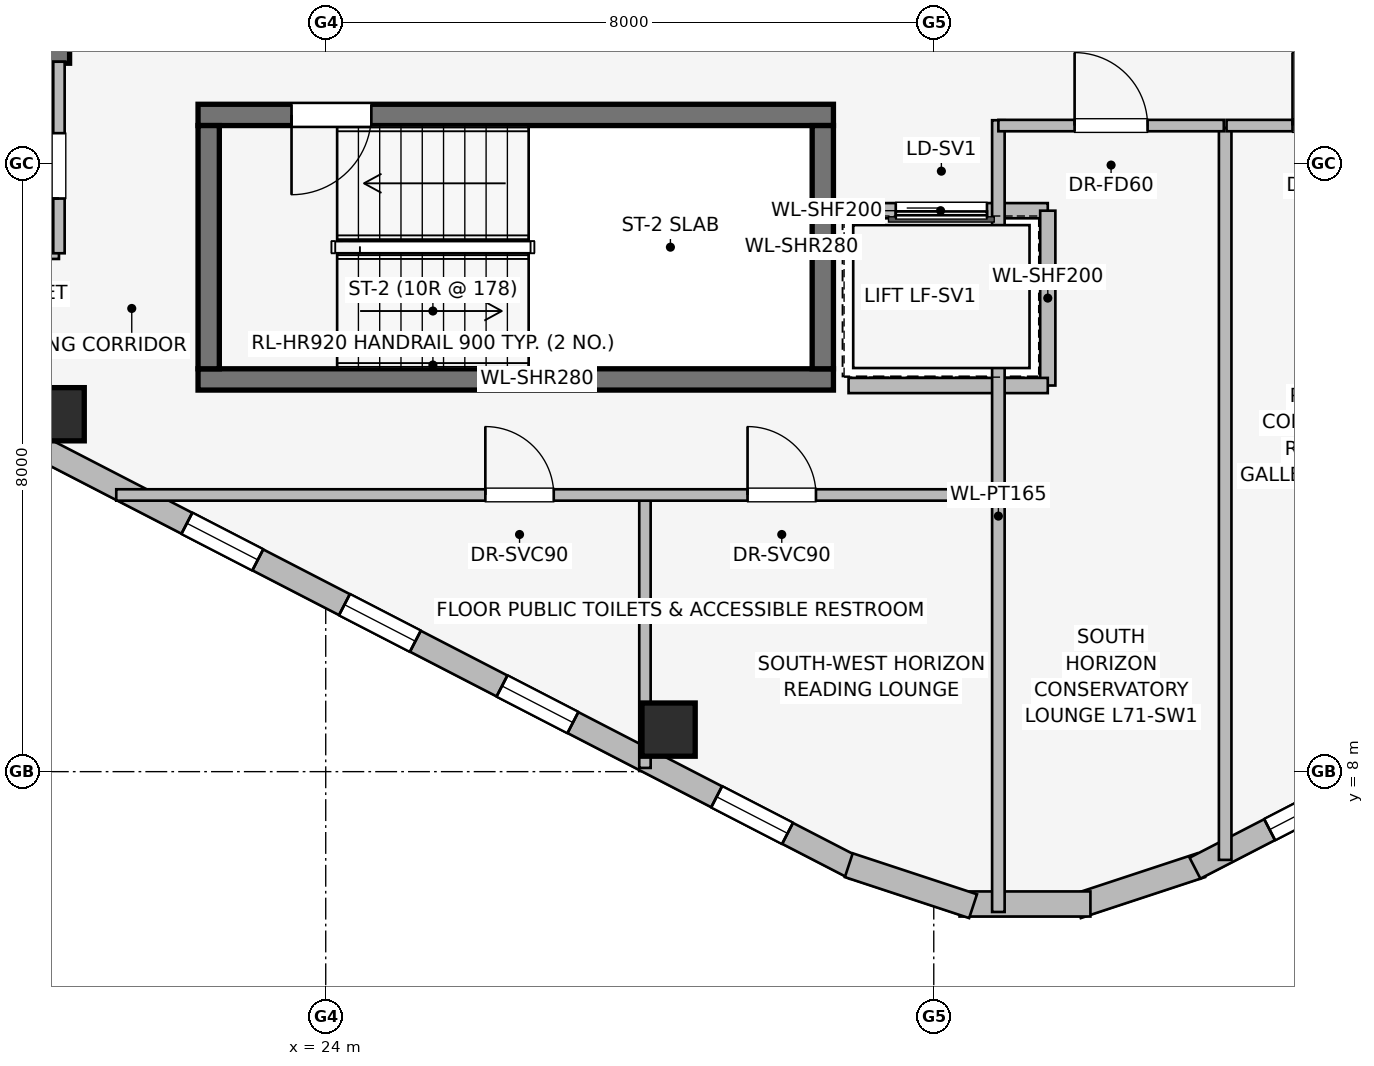
"""IFC4 building model, lengths in metres.
Left out: names, types, materials, properties, quantities, classifications, styles, units other than length and angle.
Written with IfcOpenShell. Run it as: python <this file> out.ifc"""

import sys

from ifc_helpers import new_model, si_unit, direction, frame, frame_2d, origin, origin_2d, place, context, subcontext, project, spatial, rectangle, extrude, element, fill, save


model = new_model("IFC4")
c1 = context("Model", 3, precision=1e-05, world=origin(), true_north=direction((0.0, 1.0)))
c2 = subcontext(c1, "Body", "Model", "MODEL_VIEW")
j1 = project(units=[si_unit("LENGTHUNIT", "METRE"), si_unit("PLANEANGLEUNIT", "RADIAN")], contexts=[c1])
p1 = place(None, origin())
s1 = spatial("IfcSite", under=j1, at=p1, CompositionType="ELEMENT")
p2 = place(p1, origin())
s2 = spatial("IfcBuilding", under=s1, at=p2, CompositionType="ELEMENT")
p3 = place(p2, frame((0.0, 0.0, 259.65)))
s3 = spatial("IfcBuildingStorey", under=s2, at=p3, CompositionType="ELEMENT", Elevation=259.65)
p4 = place(p3, frame((16.87, 17.46, 0.0), z_axis=(0.0, 0.0, 1.0), x_axis=(1.0, 0.0, 0.0)))
e1 = element("IfcWall", 1, at=p4, inside=s3, PredefinedType="SHEAR", context=c2, shape_type="SweptSolid", body=[
    extrude(rectangle(XDim=3.76, YDim=0.28, at=frame_2d((1.88, 0.0))), origin(), (0.0, 0.0, 1.0), 3.55),
])
p5 = place(p3, frame((22.32, 13.16, 0.0), z_axis=(0.0, 0.0, 1.0), x_axis=(1.0, 0.0, 0.0)))
e2 = element("IfcWall", 2, at=p5, inside=s3, PredefinedType="SHEAR", context=c2, shape_type="SweptSolid", body=[
    extrude(rectangle(XDim=8.36, YDim=0.28, at=frame_2d((4.18, 0.0))), origin(), (0.0, 0.0, 1.0), 3.55),
])
p6 = place(p3, frame((30.68, 16.64, 0.0), z_axis=(0.0, 0.0, 1.0), x_axis=(-1.0, 0.0, 0.0)))
e3 = element("IfcWall", 3, at=p6, inside=s3, PredefinedType="SHEAR", context=c2, shape_type="SweptSolid", body=[
    extrude(rectangle(XDim=8.36, YDim=0.28, at=frame_2d((4.18, 0.0))), origin(), (0.0, 0.0, 1.0), 3.55),
])
p7 = place(p6, frame((6.08, 0.0, 0.0)))
e4 = element("IfcOpeningElement", 4, at=p7, cuts=e3, PredefinedType="OPENING", context=c2, shape_type="SweptSolid", body=[
    extrude(rectangle(XDim=1.05, YDim=2.0, at=frame_2d((0.525, 1.0))), frame((0.0, 0.15, 0.0), z_axis=(0.0, -1.0, 0.0), x_axis=(1.0, 0.0, 0.0)), (0.0, 0.0, 1.0), 0.3),
])
for number, where, z_axis, x_axis in (
    (5, (22.46, 16.5, 0.0), (0.0, 0.0, 1.0), (0.0, -1.0, 0.0)),
    (6, (30.54, 13.3, 0.0), (0.0, 0.0, 1.0), (0.0, 1.0, 0.0)),
):
    element("IfcWall", number, at=place(p3, frame(where, z_axis=z_axis, x_axis=x_axis)), inside=s3, PredefinedType="SHEAR", context=c2, shape_type="SweptSolid", body=[
        extrude(rectangle(XDim=3.2, YDim=0.28, at=frame_2d((1.6, 0.0))), origin(), (0.0, 0.0, 1.0), 3.55),
    ])
for number, where, z_axis, x_axis in (
    (7, (20.473, 12.702, 0.0), (0.0, 0.0, 1.0), (1.0, 0.0, 0.0)),
    (8, (28.511, 8.553, 0.0), (0.0, 0.0, 1.0), (1.0, 0.0, 0.0)),
):
    element("IfcColumn", number, at=place(p3, frame(where, z_axis=z_axis, x_axis=x_axis)), inside=s3, PredefinedType="COLUMN", context=c2, shape_type="SweptSolid", body=[
        extrude(rectangle(XDim=0.7, YDim=0.7, at=origin_2d()), origin(), (0.0, 0.0, 1.0), 3.55),
    ])
p8 = place(p3, frame((30.963, 6.73, 0.0), z_axis=(0.0, 0.0, 1.0), x_axis=(-0.888581481622, 0.458718814218, 0.0)))
e9 = element("IfcWall", 9, at=p8, inside=s3, PredefinedType="STANDARD", context=c2, shape_type="SweptSolid", body=[
    extrude(rectangle(XDim=15.077, YDim=0.31, at=frame_2d((7.539, 0.0))), origin(), (0.0, 0.0, 1.0), 3.29),
])
p9 = place(p8, frame((0.998, 0.0, 0.75)))
e10 = element("IfcOpeningElement", 10, at=p9, cuts=e9, PredefinedType="OPENING", context=c2, shape_type="SweptSolid", body=[
    extrude(rectangle(XDim=1.05, YDim=1.4, at=frame_2d((0.525, 0.7))), frame((0.0, 0.165, 0.0), z_axis=(0.0, -1.0, 0.0), x_axis=(1.0, 0.0, 0.0)), (0.0, 0.0, 1.0), 0.33),
])
p10 = place(p8, frame((4.176, 0.0, 0.75)))
e11 = element("IfcOpeningElement", 11, at=p10, cuts=e9, PredefinedType="OPENING", context=c2, shape_type="SweptSolid", body=[
    extrude(rectangle(XDim=1.05, YDim=1.4, at=frame_2d((0.525, 0.7))), frame((0.0, 0.165, 0.0), z_axis=(0.0, -1.0, 0.0), x_axis=(1.0, 0.0, 0.0)), (0.0, 0.0, 1.0), 0.33),
])
p11 = place(p8, frame((6.509, 0.0, 0.75)))
e12 = element("IfcOpeningElement", 12, at=p11, cuts=e9, PredefinedType="OPENING", context=c2, shape_type="SweptSolid", body=[
    extrude(rectangle(XDim=1.05, YDim=1.4, at=frame_2d((0.525, 0.7))), frame((0.0, 0.165, 0.0), z_axis=(0.0, -1.0, 0.0), x_axis=(1.0, 0.0, 0.0)), (0.0, 0.0, 1.0), 0.33),
])
p12 = place(p8, frame((8.842, 0.0, 0.75)))
e13 = element("IfcOpeningElement", 13, at=p12, cuts=e9, PredefinedType="OPENING", context=c2, shape_type="SweptSolid", body=[
    extrude(rectangle(XDim=1.05, YDim=1.4, at=frame_2d((0.525, 0.7))), frame((0.0, 0.165, 0.0), z_axis=(0.0, -1.0, 0.0), x_axis=(1.0, 0.0, 0.0)), (0.0, 0.0, 1.0), 0.33),
])
p13 = place(p8, frame((13.029, 0.0, 0.75)))
e14 = element("IfcOpeningElement", 14, at=p13, cuts=e9, PredefinedType="OPENING", context=c2, shape_type="SweptSolid", body=[
    extrude(rectangle(XDim=1.05, YDim=1.4, at=frame_2d((0.525, 0.7))), frame((0.0, 0.165, 0.0), z_axis=(0.0, -1.0, 0.0), x_axis=(1.0, 0.0, 0.0)), (0.0, 0.0, 1.0), 0.33),
])
p14 = place(p3, frame((35.518, 6.769, 0.0), z_axis=(0.0, 0.0, 1.0), x_axis=(-0.949713440491, -0.313120393699, 0.0)))
e15 = element("IfcWall", 15, at=p14, inside=s3, PredefinedType="STANDARD", context=c2, shape_type="SweptSolid", body=[
    extrude(rectangle(XDim=1.722, YDim=0.33, at=frame_2d((0.861, 0.0))), origin(), (0.0, 0.0, 1.0), 3.29),
])
p15 = place(p3, frame((34.061, 6.259, 0.0), z_axis=(0.0, 0.0, 1.0), x_axis=(-1.0, 0.0, 0.0)))
e16 = element("IfcWall", 16, at=p15, inside=s3, PredefinedType="STANDARD", context=c2, shape_type="SweptSolid", body=[
    extrude(rectangle(XDim=1.722, YDim=0.33, at=frame_2d((0.861, 0.0))), origin(), (0.0, 0.0, 1.0), 3.29),
])
p16 = place(p3, frame((32.517, 6.23, 0.0), z_axis=(0.0, 0.0, 1.0), x_axis=(-0.949713440491, 0.313120393699, 0.0)))
e17 = element("IfcWall", 17, at=p16, inside=s3, PredefinedType="STANDARD", context=c2, shape_type="SweptSolid", body=[
    extrude(rectangle(XDim=1.722, YDim=0.33, at=frame_2d((0.861, 0.0))), origin(), (0.0, 0.0, 1.0), 3.29),
])
p17 = place(p3, frame((48.834, 13.646, 0.0), z_axis=(0.0, 0.0, 1.0), x_axis=(-0.888581481622, -0.458718814218, 0.0)))
e18 = element("IfcWall", 18, at=p17, inside=s3, PredefinedType="STANDARD", context=c2, shape_type="SweptSolid", body=[
    extrude(rectangle(XDim=15.077, YDim=0.31, at=frame_2d((7.539, 0.0))), origin(), (0.0, 0.0, 1.0), 3.29),
])
p18 = place(p17, frame((0.998, 0.0, 0.75)))
e19 = element("IfcOpeningElement", 19, at=p18, cuts=e18, PredefinedType="OPENING", context=c2, shape_type="SweptSolid", body=[
    extrude(rectangle(XDim=1.05, YDim=1.4, at=frame_2d((0.525, 0.7))), frame((0.0, 0.165, 0.0), z_axis=(0.0, -1.0, 0.0), x_axis=(1.0, 0.0, 0.0)), (0.0, 0.0, 1.0), 0.33),
])
p19 = place(p17, frame((4.295, 0.0, 0.75)))
e20 = element("IfcOpeningElement", 20, at=p19, cuts=e18, PredefinedType="OPENING", context=c2, shape_type="SweptSolid", body=[
    extrude(rectangle(XDim=1.05, YDim=1.4, at=frame_2d((0.525, 0.7))), frame((0.0, 0.165, 0.0), z_axis=(0.0, -1.0, 0.0), x_axis=(1.0, 0.0, 0.0)), (0.0, 0.0, 1.0), 0.33),
])
p20 = place(p17, frame((6.862, 0.0, 0.75)))
e21 = element("IfcOpeningElement", 21, at=p20, cuts=e18, PredefinedType="OPENING", context=c2, shape_type="SweptSolid", body=[
    extrude(rectangle(XDim=1.05, YDim=1.4, at=frame_2d((0.525, 0.7))), frame((0.0, 0.165, 0.0), z_axis=(0.0, -1.0, 0.0), x_axis=(1.0, 0.0, 0.0)), (0.0, 0.0, 1.0), 0.33),
])
p21 = place(p17, frame((9.429, 0.0, 0.75)))
e22 = element("IfcOpeningElement", 22, at=p21, cuts=e18, PredefinedType="OPENING", context=c2, shape_type="SweptSolid", body=[
    extrude(rectangle(XDim=1.05, YDim=1.4, at=frame_2d((0.525, 0.7))), frame((0.0, 0.165, 0.0), z_axis=(0.0, -1.0, 0.0), x_axis=(1.0, 0.0, 0.0)), (0.0, 0.0, 1.0), 0.33),
])
p22 = place(p17, frame((12.922, 0.0, 0.75)))
e23 = element("IfcOpeningElement", 23, at=p22, cuts=e18, PredefinedType="OPENING", context=c2, shape_type="SweptSolid", body=[
    extrude(rectangle(XDim=1.05, YDim=1.4, at=frame_2d((0.525, 0.7))), frame((0.0, 0.165, 0.0), z_axis=(0.0, -1.0, 0.0), x_axis=(1.0, 0.0, 0.0)), (0.0, 0.0, 1.0), 0.33),
])
p23 = place(p3, frame((33.5, 15.38, 0.0), z_axis=(0.0, 0.0, 1.0), x_axis=(-1.0, 0.0, 0.0)))
e24 = element("IfcWall", 24, at=p23, inside=s3, PredefinedType="PARTITIONING", context=c2, shape_type="SweptSolid", body=[
    extrude(rectangle(XDim=2.82, YDim=0.2, at=frame_2d((1.41, 0.0))), origin(), (0.0, 0.0, 1.0), 3.29),
])
p24 = place(p23, frame((0.8, 0.0, 0.0)))
e25 = element("IfcOpeningElement", 25, at=p24, cuts=e24, PredefinedType="OPENING", context=c2, shape_type="SweptSolid", body=[
    extrude(rectangle(XDim=1.2, YDim=2.2, at=frame_2d((0.6, 1.1))), frame((0.0, 0.11, 0.0), z_axis=(0.0, -1.0, 0.0), x_axis=(1.0, 0.0, 0.0)), (0.0, 0.0, 1.0), 0.22),
])
p25 = place(p3, frame((33.5, 13.08, 0.0), z_axis=(0.0, 0.0, 1.0), x_axis=(0.0, 1.0, 0.0)))
e26 = element("IfcWall", 26, at=p25, inside=s3, PredefinedType="PARTITIONING", context=c2, shape_type="SweptSolid", body=[
    extrude(rectangle(XDim=2.3, YDim=0.2, at=frame_2d((1.15, 0.0))), origin(), (0.0, 0.0, 1.0), 3.29),
])
p26 = place(p3, frame((30.879, 13.08, 0.0), z_axis=(0.0, 0.0, 1.0), x_axis=(1.0, 0.0, 0.0)))
e27 = element("IfcWall", 27, at=p26, inside=s3, PredefinedType="PARTITIONING", context=c2, shape_type="SweptSolid", body=[
    extrude(rectangle(XDim=2.621, YDim=0.2, at=frame_2d((1.311, 0.0))), origin(), (0.0, 0.0, 1.0), 3.29),
])
p27 = place(p3, frame((18.1, 14.82, 0.0), z_axis=(0.0, 0.0, 1.0), x_axis=(1.0, 0.0, 0.0)))
e28 = element("IfcWall", 28, at=p27, inside=s3, PredefinedType="PARTITIONING", context=c2, shape_type="SweptSolid", body=[
    extrude(rectangle(XDim=2.39, YDim=0.15, at=frame_2d((1.195, 0.0))), origin(), (0.0, 0.0, 1.0), 3.29),
])
p28 = place(p3, frame((20.49, 14.82, 0.0), z_axis=(0.0, 0.0, 1.0), x_axis=(0.0, 1.0, 0.0)))
e29 = element("IfcWall", 29, at=p28, inside=s3, PredefinedType="PARTITIONING", context=c2, shape_type="SweptSolid", body=[
    extrude(rectangle(XDim=2.52, YDim=0.15, at=frame_2d((1.26, 0.0))), origin(), (0.0, 0.0, 1.0), 3.29),
])
p29 = place(p28, frame((0.72, 0.0, 0.0)))
e30 = element("IfcOpeningElement", 30, at=p29, cuts=e29, PredefinedType="OPENING", context=c2, shape_type="SweptSolid", body=[
    extrude(rectangle(XDim=0.86, YDim=2.0, at=frame_2d((0.43, 1.0))), frame((0.0, 0.085, 0.0), z_axis=(0.0, -1.0, 0.0), x_axis=(1.0, 0.0, 0.0)), (0.0, 0.0, 1.0), 0.17),
])
p30 = place(p3, frame((32.85, 6.154, 0.0), z_axis=(0.0, 0.0, 1.0), x_axis=(0.0, 1.0, 0.0)))
e31 = element("IfcWall", 31, at=p30, inside=s3, PredefinedType="PARTITIONING", context=c2, shape_type="SweptSolid", body=[
    extrude(rectangle(XDim=10.416, YDim=0.165, at=frame_2d((5.208, 0.0))), origin(), (0.0, 0.0, 1.0), 3.29),
])
p31 = place(p3, frame((28.2, 8.049, 0.0), z_axis=(0.0, 0.0, 1.0), x_axis=(0.0, 1.0, 0.0)))
e32 = element("IfcWall", 32, at=p31, inside=s3, PredefinedType="PARTITIONING", context=c2, shape_type="SweptSolid", body=[
    extrude(rectangle(XDim=3.591, YDim=0.15, at=frame_2d((1.795, 0.0))), origin(), (0.0, 0.0, 1.0), 3.29),
])
p32 = place(p3, frame((21.244, 11.64, 0.0), z_axis=(0.0, 0.0, 1.0), x_axis=(1.0, 0.0, 0.0)))
e33 = element("IfcWall", 33, at=p32, inside=s3, PredefinedType="PARTITIONING", context=c2, shape_type="SweptSolid", body=[
    extrude(rectangle(XDim=11.606, YDim=0.15, at=frame_2d((5.803, 0.0))), origin(), (0.0, 0.0, 1.0), 2.833),
])
p33 = place(p32, frame((4.856, 0.0, 0.0)))
e34 = element("IfcOpeningElement", 34, at=p33, cuts=e33, PredefinedType="OPENING", context=c2, shape_type="SweptSolid", body=[
    extrude(rectangle(XDim=0.9, YDim=2.0, at=frame_2d((0.45, 1.0))), frame((0.0, 0.085, 0.0), z_axis=(0.0, -1.0, 0.0), x_axis=(1.0, 0.0, 0.0)), (0.0, 0.0, 1.0), 0.17),
])
p34 = place(p32, frame((8.306, 0.0, 0.0)))
e35 = element("IfcOpeningElement", 35, at=p34, cuts=e33, PredefinedType="OPENING", context=c2, shape_type="SweptSolid", body=[
    extrude(rectangle(XDim=0.9, YDim=2.0, at=frame_2d((0.45, 1.0))), frame((0.0, 0.085, 0.0), z_axis=(0.0, -1.0, 0.0), x_axis=(1.0, 0.0, 0.0)), (0.0, 0.0, 1.0), 0.17),
])
p35 = place(p3, frame((35.834, 6.839, 0.0), z_axis=(0.0, 0.0, 1.0), x_axis=(0.0, 1.0, 0.0)))
e36 = element("IfcWall", 36, at=p35, inside=s3, PredefinedType="PARTITIONING", context=c2, shape_type="SweptSolid", body=[
    extrude(rectangle(XDim=9.631, YDim=0.165, at=frame_2d((4.815, 0.0))), origin(), (0.0, 0.0, 1.0), 3.29),
])
p36 = place(p3, frame((32.85, 16.5, 0.0), z_axis=(0.0, 0.0, 1.0), x_axis=(1.0, 0.0, 0.0)))
e37 = element("IfcWall", 37, at=p36, inside=s3, PredefinedType="PARTITIONING", context=c2, shape_type="SweptSolid", body=[
    extrude(rectangle(XDim=2.966, YDim=0.15, at=frame_2d((1.483, 0.0))), origin(), (0.0, 0.0, 1.0), 3.29),
])
p37 = place(p36, frame((1.003, 0.0, 0.0)))
e38 = element("IfcOpeningElement", 38, at=p37, cuts=e37, PredefinedType="OPENING", context=c2, shape_type="SweptSolid", body=[
    extrude(rectangle(XDim=0.96, YDim=2.0, at=frame_2d((0.48, 1.0))), frame((0.0, 0.085, 0.0), z_axis=(0.0, -1.0, 0.0), x_axis=(1.0, 0.0, 0.0)), (0.0, 0.0, 1.0), 0.17),
])
p38 = place(p3, frame((35.852, 16.5, 0.0), z_axis=(0.0, 0.0, 1.0), x_axis=(1.0, 0.0, 0.0)))
e39 = element("IfcWall", 39, at=p38, inside=s3, PredefinedType="PARTITIONING", context=c2, shape_type="SweptSolid", body=[
    extrude(rectangle(XDim=2.696, YDim=0.15, at=frame_2d((1.348, 0.0))), origin(), (0.0, 0.0, 1.0), 3.29),
])
p39 = place(p38, frame((0.868, 0.0, 0.0)))
e40 = element("IfcOpeningElement", 40, at=p39, cuts=e39, PredefinedType="OPENING", context=c2, shape_type="SweptSolid", body=[
    extrude(rectangle(XDim=0.96, YDim=2.0, at=frame_2d((0.48, 1.0))), frame((0.0, 0.085, 0.0), z_axis=(0.0, -1.0, 0.0), x_axis=(1.0, 0.0, 0.0)), (0.0, 0.0, 1.0), 0.17),
])
p40 = place(p9, origin())
e41 = element("IfcWindow", 41, at=p40, inside=s3, PartitioningType="SINGLE_PANEL", PredefinedType="WINDOW", context=c2, shape_type="SweptSolid", body=[
    extrude(rectangle(XDim=1.05, YDim=1.4, at=frame_2d((0.525, 0.7))), frame((0.0, 0.03, 0.0), z_axis=(0.0, -1.0, 0.0), x_axis=(1.0, 0.0, 0.0)), (0.0, 0.0, 1.0), 0.06),
])
fill(e10, e41)
p41 = place(p10, origin())
e42 = element("IfcWindow", 42, at=p41, inside=s3, PartitioningType="SINGLE_PANEL", PredefinedType="WINDOW", context=c2, shape_type="SweptSolid", body=[
    extrude(rectangle(XDim=1.05, YDim=1.4, at=frame_2d((0.525, 0.7))), frame((0.0, 0.03, 0.0), z_axis=(0.0, -1.0, 0.0), x_axis=(1.0, 0.0, 0.0)), (0.0, 0.0, 1.0), 0.06),
])
fill(e11, e42)
p42 = place(p11, origin())
e43 = element("IfcWindow", 43, at=p42, inside=s3, PartitioningType="SINGLE_PANEL", PredefinedType="WINDOW", context=c2, shape_type="SweptSolid", body=[
    extrude(rectangle(XDim=1.05, YDim=1.4, at=frame_2d((0.525, 0.7))), frame((0.0, 0.03, 0.0), z_axis=(0.0, -1.0, 0.0), x_axis=(1.0, 0.0, 0.0)), (0.0, 0.0, 1.0), 0.06),
])
fill(e12, e43)
p43 = place(p12, origin())
e44 = element("IfcWindow", 44, at=p43, inside=s3, PartitioningType="SINGLE_PANEL", PredefinedType="WINDOW", context=c2, shape_type="SweptSolid", body=[
    extrude(rectangle(XDim=1.05, YDim=1.4, at=frame_2d((0.525, 0.7))), frame((0.0, 0.03, 0.0), z_axis=(0.0, -1.0, 0.0), x_axis=(1.0, 0.0, 0.0)), (0.0, 0.0, 1.0), 0.06),
])
fill(e13, e44)
p44 = place(p22, origin())
e45 = element("IfcWindow", 45, at=p44, inside=s3, PartitioningType="SINGLE_PANEL", PredefinedType="WINDOW", context=c2, shape_type="SweptSolid", body=[
    extrude(rectangle(XDim=1.05, YDim=1.4, at=frame_2d((0.525, 0.7))), frame((0.0, 0.03, 0.0), z_axis=(0.0, -1.0, 0.0), x_axis=(1.0, 0.0, 0.0)), (0.0, 0.0, 1.0), 0.06),
])
fill(e23, e45)
p45 = place(p7, origin())
e46 = element("IfcDoor", 46, at=p45, inside=s3, OperationType="SINGLE_SWING_RIGHT", PredefinedType="DOOR", context=c2, shape_type="SweptSolid", body=[
    extrude(rectangle(XDim=1.05, YDim=2.0, at=frame_2d((0.525, 1.0))), frame((0.0, 0.025, 0.0), z_axis=(0.0, -1.0, 0.0), x_axis=(1.0, 0.0, 0.0)), (0.0, 0.0, 1.0), 0.05),
])
fill(e4, e46)
p46 = place(p24, origin())
e47 = element("IfcDoor", 47, at=p46, inside=s3, OperationType="SLIDING_TO_RIGHT", PredefinedType="DOOR", context=c2, shape_type="SweptSolid", body=[
    extrude(rectangle(XDim=1.2, YDim=2.2, at=frame_2d((0.6, 1.1))), frame((0.0, 0.025, 0.0), z_axis=(0.0, -1.0, 0.0), x_axis=(1.0, 0.0, 0.0)), (0.0, 0.0, 1.0), 0.05),
])
fill(e25, e47)
p47 = place(p29, origin())
e48 = element("IfcDoor", 48, at=p47, inside=s3, OperationType="SINGLE_SWING_LEFT", PredefinedType="DOOR", context=c2, shape_type="SweptSolid", body=[
    extrude(rectangle(XDim=0.86, YDim=2.0, at=frame_2d((0.43, 1.0))), frame((0.0, 0.025, 0.0), z_axis=(0.0, -1.0, 0.0), x_axis=(1.0, 0.0, 0.0)), (0.0, 0.0, 1.0), 0.05),
])
fill(e30, e48)
p48 = place(p33, origin())
e49 = element("IfcDoor", 49, at=p48, inside=s3, OperationType="SINGLE_SWING_LEFT", PredefinedType="DOOR", context=c2, shape_type="SweptSolid", body=[
    extrude(rectangle(XDim=0.9, YDim=2.0, at=frame_2d((0.45, 1.0))), frame((0.0, 0.025, 0.0), z_axis=(0.0, -1.0, 0.0), x_axis=(1.0, 0.0, 0.0)), (0.0, 0.0, 1.0), 0.05),
])
fill(e34, e49)
p49 = place(p34, origin())
e50 = element("IfcDoor", 50, at=p49, inside=s3, OperationType="SINGLE_SWING_LEFT", PredefinedType="DOOR", context=c2, shape_type="SweptSolid", body=[
    extrude(rectangle(XDim=0.9, YDim=2.0, at=frame_2d((0.45, 1.0))), frame((0.0, 0.025, 0.0), z_axis=(0.0, -1.0, 0.0), x_axis=(1.0, 0.0, 0.0)), (0.0, 0.0, 1.0), 0.05),
])
fill(e35, e50)
p50 = place(p37, origin())
e51 = element("IfcDoor", 51, at=p50, inside=s3, OperationType="SINGLE_SWING_LEFT", PredefinedType="DOOR", context=c2, shape_type="SweptSolid", body=[
    extrude(rectangle(XDim=0.96, YDim=2.0, at=frame_2d((0.48, 1.0))), frame((0.0, 0.025, 0.0), z_axis=(0.0, -1.0, 0.0), x_axis=(1.0, 0.0, 0.0)), (0.0, 0.0, 1.0), 0.05),
])
fill(e38, e51)
p51 = place(p39, origin())
e52 = element("IfcDoor", 52, at=p51, inside=s3, OperationType="SINGLE_SWING_LEFT", PredefinedType="DOOR", context=c2, shape_type="SweptSolid", body=[
    extrude(rectangle(XDim=0.96, YDim=2.0, at=frame_2d((0.48, 1.0))), frame((0.0, 0.025, 0.0), z_axis=(0.0, -1.0, 0.0), x_axis=(1.0, 0.0, 0.0)), (0.0, 0.0, 1.0), 0.05),
])
fill(e40, e52)
save(model, sys.argv[1])
